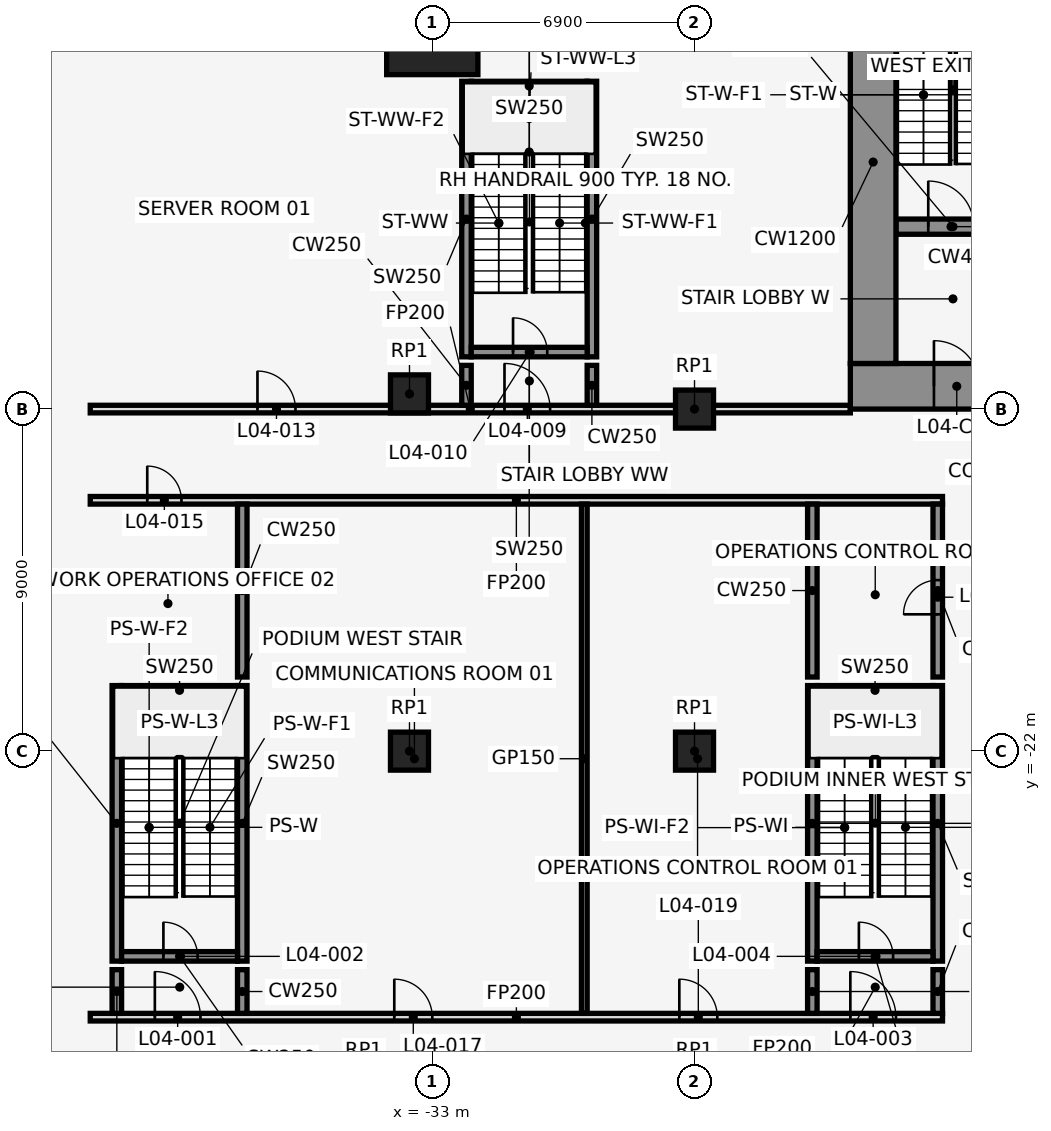
"""IFC4 building model, lengths in metres.
Left out: names, types, materials, properties, quantities, classifications, styles, units other than length and angle.
Written with IfcOpenShell. Run it as: python <this file> out.ifc"""

import sys

from ifc_helpers import new_model, si_unit, direction, frame, frame_2d, origin, origin_2d, place, context, subcontext, project, spatial, rectangle, extrude, element, fill, save


model = new_model("IFC4")
c1 = context("Model", 3, precision=1e-05, world=origin(), true_north=direction((0.0, 1.0)))
c2 = subcontext(c1, "Body", "Model", "MODEL_VIEW")
j1 = project(units=[si_unit("LENGTHUNIT", "METRE"), si_unit("PLANEANGLEUNIT", "RADIAN")], contexts=[c1])
p1 = place(None, origin())
s1 = spatial("IfcSite", under=j1, at=p1, CompositionType="ELEMENT")
p2 = place(p1, origin())
s2 = spatial("IfcBuilding", under=s1, at=p2, CompositionType="ELEMENT")
p3 = place(p2, frame((0.0, 0.0, 25.0)))
s3 = spatial("IfcBuildingStorey", under=s2, at=p3, CompositionType="ELEMENT", Elevation=25.0)
p4 = place(p3, frame((-33.0, -3.0, 0.0), z_axis=(0.0, 0.0, 1.0), x_axis=(1.0, 0.0, 0.0)))
e1 = element("IfcColumn", 1, at=p4, inside=s3, PredefinedType="COLUMN", context=c2, shape_type="SweptSolid", body=[
    extrude(rectangle(XDim=2.4, YDim=2.4, at=origin_2d()), origin(), (0.0, 0.0, 1.0), 5.0),
])
for number, where, z_axis, x_axis in (
    (2, (-33.6, -12.6, 0.0), (0.0, 0.0, 1.0), (1.0, 0.0, 0.0)),
    (3, (-33.6, -22.0, 0.0), (0.0, 0.0, 1.0), (1.0, 0.0, 0.0)),
    (4, (-26.1, -22.0, 0.0), (0.0, 0.0, 1.0), (1.0, 0.0, 0.0)),
    (5, (-26.1, -13.0, 0.0), (0.0, 0.0, 1.0), (1.0, 0.0, 0.0)),
):
    element("IfcColumn", number, at=place(p3, frame(where, z_axis=z_axis, x_axis=x_axis)), inside=s3, PredefinedType="COLUMN", context=c2, shape_type="SweptSolid", body=[
        extrude(rectangle(XDim=1.0, YDim=1.0, at=origin_2d()), origin(), (0.0, 0.0, 1.0), 5.0),
    ])
for number, where, z_axis, x_axis in (
    (6, (-32.1, -11.625, 0.0), (0.0, 0.0, 1.0), (0.0, 1.0, 0.0)),
    (7, (-28.8, -11.625, 0.0), (0.0, 0.0, 1.0), (0.0, 1.0, 0.0)),
):
    element("IfcWall", number, at=place(p3, frame(where, z_axis=z_axis, x_axis=x_axis)), inside=s3, PredefinedType="SHEAR", context=c2, shape_type="SweptSolid", body=[
        extrude(rectangle(XDim=7.25, YDim=0.25, at=frame_2d((3.625, 0.0))), origin(), (0.0, 0.0, 1.0), 5.0),
    ])
p5 = place(p3, frame((-31.975, -11.5, 0.0), z_axis=(0.0, 0.0, 1.0), x_axis=(1.0, 0.0, 0.0)))
e8 = element("IfcWall", 8, at=p5, inside=s3, PredefinedType="SHEAR", context=c2, shape_type="SweptSolid", body=[
    extrude(rectangle(XDim=3.05, YDim=0.25, at=frame_2d((1.525, 0.0))), origin(), (0.0, 0.0, 1.0), 5.0),
])
p6 = place(p5, frame((1.1, 0.0, 0.0)))
e9 = element("IfcOpeningElement", 9, at=p6, cuts=e8, PredefinedType="OPENING", context=c2, shape_type="SweptSolid", body=[
    extrude(rectangle(XDim=0.9, YDim=2.1, at=frame_2d((0.45, 1.05))), frame((0.0, 0.137, 0.0), z_axis=(0.0, -1.0, 0.0), x_axis=(1.0, 0.0, 0.0)), (0.0, 0.0, 1.0), 0.274),
])
p7 = place(p3, frame((-31.975, -4.5, 0.0), z_axis=(0.0, 0.0, 1.0), x_axis=(1.0, 0.0, 0.0)))
e10 = element("IfcWall", 10, at=p7, inside=s3, PredefinedType="SHEAR", context=c2, shape_type="SweptSolid", body=[
    extrude(rectangle(XDim=3.05, YDim=0.25, at=frame_2d((1.525, 0.0))), origin(), (0.0, 0.0, 1.0), 5.0),
])
for number, where, z_axis, x_axis in (
    (11, (-41.3, -27.525, 0.0), (0.0, 0.0, 1.0), (0.0, 1.0, 0.0)),
    (12, (-38.0, -27.525, 0.0), (0.0, 0.0, 1.0), (0.0, 1.0, 0.0)),
):
    element("IfcWall", number, at=place(p3, frame(where, z_axis=z_axis, x_axis=x_axis)), inside=s3, PredefinedType="SHEAR", context=c2, shape_type="SweptSolid", body=[
        extrude(rectangle(XDim=7.25, YDim=0.25, at=frame_2d((3.625, 0.0))), origin(), (0.0, 0.0, 1.0), 5.0),
    ])
p8 = place(p3, frame((-41.175, -27.4, 0.0), z_axis=(0.0, 0.0, 1.0), x_axis=(1.0, 0.0, 0.0)))
e13 = element("IfcWall", 13, at=p8, inside=s3, PredefinedType="SHEAR", context=c2, shape_type="SweptSolid", body=[
    extrude(rectangle(XDim=3.05, YDim=0.25, at=frame_2d((1.525, 0.0))), origin(), (0.0, 0.0, 1.0), 5.0),
])
p9 = place(p8, frame((1.1, 0.0, 0.0)))
e14 = element("IfcOpeningElement", 14, at=p9, cuts=e13, PredefinedType="OPENING", context=c2, shape_type="SweptSolid", body=[
    extrude(rectangle(XDim=0.9, YDim=2.1, at=frame_2d((0.45, 1.05))), frame((0.0, 0.137, 0.0), z_axis=(0.0, -1.0, 0.0), x_axis=(1.0, 0.0, 0.0)), (0.0, 0.0, 1.0), 0.274),
])
p10 = place(p3, frame((-41.175, -20.4, 0.0), z_axis=(0.0, 0.0, 1.0), x_axis=(1.0, 0.0, 0.0)))
e15 = element("IfcWall", 15, at=p10, inside=s3, PredefinedType="SHEAR", context=c2, shape_type="SweptSolid", body=[
    extrude(rectangle(XDim=3.05, YDim=0.25, at=frame_2d((1.525, 0.0))), origin(), (0.0, 0.0, 1.0), 5.0),
])
for number, where, z_axis, x_axis in (
    (16, (-23.0, -27.525, 0.0), (0.0, 0.0, 1.0), (0.0, 1.0, 0.0)),
    (17, (-19.7, -27.525, 0.0), (0.0, 0.0, 1.0), (0.0, 1.0, 0.0)),
):
    element("IfcWall", number, at=place(p3, frame(where, z_axis=z_axis, x_axis=x_axis)), inside=s3, PredefinedType="SHEAR", context=c2, shape_type="SweptSolid", body=[
        extrude(rectangle(XDim=7.25, YDim=0.25, at=frame_2d((3.625, 0.0))), origin(), (0.0, 0.0, 1.0), 5.0),
    ])
p11 = place(p3, frame((-22.875, -27.4, 0.0), z_axis=(0.0, 0.0, 1.0), x_axis=(1.0, 0.0, 0.0)))
e18 = element("IfcWall", 18, at=p11, inside=s3, PredefinedType="SHEAR", context=c2, shape_type="SweptSolid", body=[
    extrude(rectangle(XDim=3.05, YDim=0.25, at=frame_2d((1.525, 0.0))), origin(), (0.0, 0.0, 1.0), 5.0),
])
p12 = place(p11, frame((1.1, 0.0, 0.0)))
e19 = element("IfcOpeningElement", 19, at=p12, cuts=e18, PredefinedType="OPENING", context=c2, shape_type="SweptSolid", body=[
    extrude(rectangle(XDim=0.9, YDim=2.1, at=frame_2d((0.45, 1.05))), frame((0.0, 0.137, 0.0), z_axis=(0.0, -1.0, 0.0), x_axis=(1.0, 0.0, 0.0)), (0.0, 0.0, 1.0), 0.274),
])
p13 = place(p3, frame((-22.875, -20.4, 0.0), z_axis=(0.0, 0.0, 1.0), x_axis=(1.0, 0.0, 0.0)))
e20 = element("IfcWall", 20, at=p13, inside=s3, PredefinedType="SHEAR", context=c2, shape_type="SweptSolid", body=[
    extrude(rectangle(XDim=3.05, YDim=0.25, at=frame_2d((1.525, 0.0))), origin(), (0.0, 0.0, 1.0), 5.0),
])
p14 = place(p3, frame((-42.0, -29.0, 0.0), z_axis=(0.0, 0.0, 1.0), x_axis=(1.0, 0.0, 0.0)))
e21 = element("IfcWall", 21, at=p14, inside=s3, PredefinedType="PARTITIONING", context=c2, shape_type="SweptSolid", body=[
    extrude(rectangle(XDim=22.425, YDim=0.2, at=frame_2d((11.212, 0.0))), origin(), (0.0, 0.0, 1.0), 4.7),
])
p15 = place(p14, frame((1.7, 0.0, 0.0)))
e22 = element("IfcOpeningElement", 22, at=p15, cuts=e21, PredefinedType="OPENING", context=c2, shape_type="SweptSolid", body=[
    extrude(rectangle(XDim=1.2, YDim=2.1, at=frame_2d((0.6, 1.05))), frame((0.0, 0.112, 0.0), z_axis=(0.0, -1.0, 0.0), x_axis=(1.0, 0.0, 0.0)), (0.0, 0.0, 1.0), 0.224),
])
p16 = place(p14, frame((20.0, 0.0, 0.0)))
e23 = element("IfcOpeningElement", 23, at=p16, cuts=e21, PredefinedType="OPENING", context=c2, shape_type="SweptSolid", body=[
    extrude(rectangle(XDim=1.2, YDim=2.1, at=frame_2d((0.6, 1.05))), frame((0.0, 0.112, 0.0), z_axis=(0.0, -1.0, 0.0), x_axis=(1.0, 0.0, 0.0)), (0.0, 0.0, 1.0), 0.224),
])
p17 = place(p14, frame((8.0, 0.0, 0.0)))
e24 = element("IfcOpeningElement", 24, at=p17, cuts=e21, PredefinedType="OPENING", context=c2, shape_type="SweptSolid", body=[
    extrude(rectangle(XDim=1.0, YDim=2.1, at=frame_2d((0.5, 1.05))), frame((0.0, 0.112, 0.0), z_axis=(0.0, -1.0, 0.0), x_axis=(1.0, 0.0, 0.0)), (0.0, 0.0, 1.0), 0.224),
])
p18 = place(p14, frame((15.5, 0.0, 0.0)))
e25 = element("IfcOpeningElement", 25, at=p18, cuts=e21, PredefinedType="OPENING", context=c2, shape_type="SweptSolid", body=[
    extrude(rectangle(XDim=1.0, YDim=2.1, at=frame_2d((0.5, 1.05))), frame((0.0, 0.112, 0.0), z_axis=(0.0, -1.0, 0.0), x_axis=(1.0, 0.0, 0.0)), (0.0, 0.0, 1.0), 0.224),
])
p19 = place(p3, frame((-42.0, -15.4, 0.0), z_axis=(0.0, 0.0, 1.0), x_axis=(1.0, 0.0, 0.0)))
e26 = element("IfcWall", 26, at=p19, inside=s3, PredefinedType="PARTITIONING", context=c2, shape_type="SweptSolid", body=[
    extrude(rectangle(XDim=22.425, YDim=0.2, at=frame_2d((11.212, 0.0))), origin(), (0.0, 0.0, 1.0), 4.7),
])
p20 = place(p19, frame((1.5, 0.0, 0.0)))
e27 = element("IfcOpeningElement", 27, at=p20, cuts=e26, PredefinedType="OPENING", context=c2, shape_type="SweptSolid", body=[
    extrude(rectangle(XDim=0.9, YDim=2.1, at=frame_2d((0.45, 1.05))), frame((0.0, 0.112, 0.0), z_axis=(0.0, -1.0, 0.0), x_axis=(1.0, 0.0, 0.0)), (0.0, 0.0, 1.0), 0.224),
])
p21 = place(p3, frame((-42.0, -13.0, 0.0), z_axis=(0.0, 0.0, 1.0), x_axis=(1.0, 0.0, 0.0)))
e28 = element("IfcWall", 28, at=p21, inside=s3, PredefinedType="PARTITIONING", context=c2, shape_type="SweptSolid", body=[
    extrude(rectangle(XDim=20.0, YDim=0.2, at=frame_2d((10.0, 0.0))), origin(), (0.0, 0.0, 1.0), 4.7),
])
p22 = place(p21, frame((10.9, 0.0, 0.0)))
e29 = element("IfcOpeningElement", 29, at=p22, cuts=e28, PredefinedType="OPENING", context=c2, shape_type="SweptSolid", body=[
    extrude(rectangle(XDim=1.2, YDim=2.1, at=frame_2d((0.6, 1.05))), frame((0.0, 0.112, 0.0), z_axis=(0.0, -1.0, 0.0), x_axis=(1.0, 0.0, 0.0)), (0.0, 0.0, 1.0), 0.224),
])
p23 = place(p21, frame((4.4, 0.0, 0.0)))
e30 = element("IfcOpeningElement", 30, at=p23, cuts=e28, PredefinedType="OPENING", context=c2, shape_type="SweptSolid", body=[
    extrude(rectangle(XDim=1.0, YDim=2.1, at=frame_2d((0.5, 1.05))), frame((0.0, 0.112, 0.0), z_axis=(0.0, -1.0, 0.0), x_axis=(1.0, 0.0, 0.0)), (0.0, 0.0, 1.0), 0.224),
])
for number, where, z_axis, x_axis in (
    (31, (-41.3, -28.9, 0.0), (0.0, 0.0, 1.0), (0.0, 1.0, 0.0)),
    (32, (-38.0, -28.9, 0.0), (0.0, 0.0, 1.0), (0.0, 1.0, 0.0)),
):
    element("IfcWall", number, at=place(p3, frame(where, z_axis=z_axis, x_axis=x_axis)), inside=s3, PredefinedType="SHEAR", context=c2, shape_type="SweptSolid", body=[
        extrude(rectangle(XDim=1.15, YDim=0.25, at=frame_2d((0.575, 0.0))), origin(), (0.0, 0.0, 1.0), 5.0),
    ])
p24 = place(p3, frame((-38.0, -20.05, 0.0), z_axis=(0.0, 0.0, 1.0), x_axis=(0.0, 1.0, 0.0)))
e33 = element("IfcWall", 33, at=p24, inside=s3, PredefinedType="SHEAR", context=c2, shape_type="SweptSolid", body=[
    extrude(rectangle(XDim=4.55, YDim=0.25, at=frame_2d((2.275, 0.0))), origin(), (0.0, 0.0, 1.0), 5.0),
])
p25 = place(p3, frame((-32.1, -12.9, 0.0), z_axis=(0.0, 0.0, 1.0), x_axis=(0.0, 1.0, 0.0)))
e34 = element("IfcWall", 34, at=p25, inside=s3, PredefinedType="SHEAR", context=c2, shape_type="SweptSolid", body=[
    extrude(rectangle(XDim=1.05, YDim=0.25, at=frame_2d((0.525, 0.0))), origin(), (0.0, 0.0, 1.0), 5.0),
])
p26 = place(p3, frame((-29.0, -28.9, 0.0), z_axis=(0.0, 0.0, 1.0), x_axis=(0.0, 1.0, 0.0)))
e35 = element("IfcWall", 35, at=p26, inside=s3, PredefinedType="PARTITIONING", context=c2, shape_type="SweptSolid", body=[
    extrude(rectangle(XDim=13.4, YDim=0.15, at=frame_2d((6.7, 0.0))), origin(), (0.0, 0.0, 1.0), 4.7),
])
p27 = place(p3, frame((-28.8, -12.9, 0.0), z_axis=(0.0, 0.0, 1.0), x_axis=(0.0, 1.0, 0.0)))
e36 = element("IfcWall", 36, at=p27, inside=s3, PredefinedType="SHEAR", context=c2, shape_type="SweptSolid", body=[
    extrude(rectangle(XDim=1.05, YDim=0.25, at=frame_2d((0.525, 0.0))), origin(), (0.0, 0.0, 1.0), 5.0),
])
p28 = place(p3, frame((-23.0, -28.9, 0.0), z_axis=(0.0, 0.0, 1.0), x_axis=(0.0, 1.0, 0.0)))
e37 = element("IfcWall", 37, at=p28, inside=s3, PredefinedType="SHEAR", context=c2, shape_type="SweptSolid", body=[
    extrude(rectangle(XDim=1.15, YDim=0.25, at=frame_2d((0.575, 0.0))), origin(), (0.0, 0.0, 1.0), 5.0),
])
p29 = place(p3, frame((-23.0, -20.05, 0.0), z_axis=(0.0, 0.0, 1.0), x_axis=(0.0, 1.0, 0.0)))
e38 = element("IfcWall", 38, at=p29, inside=s3, PredefinedType="SHEAR", context=c2, shape_type="SweptSolid", body=[
    extrude(rectangle(XDim=4.55, YDim=0.25, at=frame_2d((2.275, 0.0))), origin(), (0.0, 0.0, 1.0), 5.0),
])
p30 = place(p3, frame((-19.7, -28.9, 0.0), z_axis=(0.0, 0.0, 1.0), x_axis=(0.0, 1.0, 0.0)))
e39 = element("IfcWall", 39, at=p30, inside=s3, PredefinedType="SHEAR", context=c2, shape_type="SweptSolid", body=[
    extrude(rectangle(XDim=1.15, YDim=0.25, at=frame_2d((0.575, 0.0))), origin(), (0.0, 0.0, 1.0), 5.0),
])
p31 = place(p3, frame((-19.7, -20.05, 0.0), z_axis=(0.0, 0.0, 1.0), x_axis=(0.0, 1.0, 0.0)))
e40 = element("IfcWall", 40, at=p31, inside=s3, PredefinedType="SHEAR", context=c2, shape_type="SweptSolid", body=[
    extrude(rectangle(XDim=4.55, YDim=0.25, at=frame_2d((2.275, 0.0))), origin(), (0.0, 0.0, 1.0), 5.0),
])
p32 = place(p31, frame((1.65, 0.0, 0.0)))
e41 = element("IfcOpeningElement", 41, at=p32, cuts=e40, PredefinedType="OPENING", context=c2, shape_type="SweptSolid", body=[
    extrude(rectangle(XDim=0.9, YDim=2.1, at=frame_2d((0.45, 1.05))), frame((0.0, 0.137, 0.0), z_axis=(0.0, -1.0, 0.0), x_axis=(1.0, 0.0, 0.0)), (0.0, 0.0, 1.0), 0.274),
])
p33 = place(p3, frame((-20.8, -8.2, 0.0), z_axis=(0.0, 0.0, 1.0), x_axis=(1.0, 0.0, 0.0)))
e42 = element("IfcWall", 42, at=p33, inside=s3, PredefinedType="SHEAR", context=c2, shape_type="SweptSolid", body=[
    extrude(rectangle(XDim=3.0, YDim=0.4, at=frame_2d((1.5, 0.0))), origin(), (0.0, 0.0, 1.0), 5.0),
])
p34 = place(p33, frame((0.85, 0.0, 0.0)))
e43 = element("IfcOpeningElement", 43, at=p34, cuts=e42, PredefinedType="OPENING", context=c2, shape_type="SweptSolid", body=[
    extrude(rectangle(XDim=1.2, YDim=2.1, at=frame_2d((0.6, 1.05))), frame((0.0, 0.212, 0.0), z_axis=(0.0, -1.0, 0.0), x_axis=(1.0, 0.0, 0.0)), (0.0, 0.0, 1.0), 0.424),
])
p35 = place(p3, frame((-22.0, -12.4, 0.0), z_axis=(0.0, 0.0, 1.0), x_axis=(1.0, 0.0, 0.0)))
e44 = element("IfcWall", 44, at=p35, inside=s3, PredefinedType="SHEAR", context=c2, shape_type="SweptSolid", body=[
    extrude(rectangle(XDim=44.0, YDim=1.2, at=frame_2d((22.0, 0.0))), origin(), (0.0, 0.0, 1.0), 5.0),
])
p36 = place(p35, frame((2.2, 0.0, 0.0)))
e45 = element("IfcOpeningElement", 45, at=p36, cuts=e44, PredefinedType="OPENING", context=c2, shape_type="SweptSolid", body=[
    extrude(rectangle(XDim=1.2, YDim=2.1, at=frame_2d((0.6, 1.05))), frame((0.0, 0.612, 0.0), z_axis=(0.0, -1.0, 0.0), x_axis=(1.0, 0.0, 0.0)), (0.0, 0.0, 1.0), 1.224),
])
p37 = place(p35, frame((21.4, 0.0, 0.0)))
e46 = element("IfcOpeningElement", 46, at=p37, cuts=e44, PredefinedType="OPENING", context=c2, shape_type="SweptSolid", body=[
    extrude(rectangle(XDim=1.2, YDim=2.1, at=frame_2d((0.6, 1.05))), frame((0.0, 0.612, 0.0), z_axis=(0.0, -1.0, 0.0), x_axis=(1.0, 0.0, 0.0)), (0.0, 0.0, 1.0), 1.224),
])
p38 = place(p35, frame((40.6, 0.0, 0.0)))
e47 = element("IfcOpeningElement", 47, at=p38, cuts=e44, PredefinedType="OPENING", context=c2, shape_type="SweptSolid", body=[
    extrude(rectangle(XDim=1.2, YDim=2.1, at=frame_2d((0.6, 1.05))), frame((0.0, 0.612, 0.0), z_axis=(0.0, -1.0, 0.0), x_axis=(1.0, 0.0, 0.0)), (0.0, 0.0, 1.0), 1.224),
])
p39 = place(p35, frame((16.0, 0.0, 0.0)))
e48 = element("IfcOpeningElement", 48, at=p39, cuts=e44, PredefinedType="OPENING", context=c2, shape_type="SweptSolid", body=[
    extrude(rectangle(XDim=1.8, YDim=2.1, at=frame_2d((0.9, 1.05))), frame((0.0, 0.612, 0.0), z_axis=(0.0, -1.0, 0.0), x_axis=(1.0, 0.0, 0.0)), (0.0, 0.0, 1.0), 1.224),
])
p40 = place(p35, frame((6.3, 0.0, 0.0)))
e49 = element("IfcOpeningElement", 49, at=p40, cuts=e44, PredefinedType="OPENING", context=c2, shape_type="SweptSolid", body=[
    extrude(rectangle(XDim=1.2, YDim=2.1, at=frame_2d((0.6, 1.05))), frame((0.0, 0.612, 0.0), z_axis=(0.0, -1.0, 0.0), x_axis=(1.0, 0.0, 0.0)), (0.0, 0.0, 1.0), 1.224),
])
p41 = place(p35, frame((26.2, 0.0, 0.0)))
e50 = element("IfcOpeningElement", 50, at=p41, cuts=e44, PredefinedType="OPENING", context=c2, shape_type="SweptSolid", body=[
    extrude(rectangle(XDim=1.8, YDim=2.1, at=frame_2d((0.9, 1.05))), frame((0.0, 0.612, 0.0), z_axis=(0.0, -1.0, 0.0), x_axis=(1.0, 0.0, 0.0)), (0.0, 0.0, 1.0), 1.224),
])
p42 = place(p35, frame((36.5, 0.0, 0.0)))
e51 = element("IfcOpeningElement", 51, at=p42, cuts=e44, PredefinedType="OPENING", context=c2, shape_type="SweptSolid", body=[
    extrude(rectangle(XDim=1.2, YDim=2.1, at=frame_2d((0.6, 1.05))), frame((0.0, 0.612, 0.0), z_axis=(0.0, -1.0, 0.0), x_axis=(1.0, 0.0, 0.0)), (0.0, 0.0, 1.0), 1.224),
])
p43 = place(p3, frame((-21.4, -11.8, 0.0), z_axis=(0.0, 0.0, 1.0), x_axis=(0.0, 1.0, 0.0)))
e52 = element("IfcWall", 52, at=p43, inside=s3, PredefinedType="SHEAR", context=c2, shape_type="SweptSolid", body=[
    extrude(rectangle(XDim=10.6, YDim=1.2, at=frame_2d((5.3, 0.0))), origin(), (0.0, 0.0, 1.0), 5.0),
])
p44 = place(p15, origin())
e53 = element("IfcDoor", 53, at=p44, inside=s3, OperationType="SINGLE_SWING_LEFT", PredefinedType="DOOR", context=c2, shape_type="SweptSolid", body=[
    extrude(rectangle(XDim=1.2, YDim=2.1, at=frame_2d((0.6, 1.05))), frame((0.0, 0.025, 0.0), z_axis=(0.0, -1.0, 0.0), x_axis=(1.0, 0.0, 0.0)), (0.0, 0.0, 1.0), 0.05),
])
fill(e22, e53)
p45 = place(p9, origin())
e54 = element("IfcDoor", 54, at=p45, inside=s3, OperationType="SINGLE_SWING_LEFT", PredefinedType="DOOR", context=c2, shape_type="SweptSolid", body=[
    extrude(rectangle(XDim=0.9, YDim=2.1, at=frame_2d((0.45, 1.05))), frame((0.0, 0.025, 0.0), z_axis=(0.0, -1.0, 0.0), x_axis=(1.0, 0.0, 0.0)), (0.0, 0.0, 1.0), 0.05),
])
fill(e14, e54)
p46 = place(p16, origin())
e55 = element("IfcDoor", 55, at=p46, inside=s3, OperationType="SINGLE_SWING_RIGHT", PredefinedType="DOOR", context=c2, shape_type="SweptSolid", body=[
    extrude(rectangle(XDim=1.2, YDim=2.1, at=frame_2d((0.6, 1.05))), frame((0.0, 0.025, 0.0), z_axis=(0.0, -1.0, 0.0), x_axis=(1.0, 0.0, 0.0)), (0.0, 0.0, 1.0), 0.05),
])
fill(e23, e55)
p47 = place(p12, origin())
e56 = element("IfcDoor", 56, at=p47, inside=s3, OperationType="SINGLE_SWING_LEFT", PredefinedType="DOOR", context=c2, shape_type="SweptSolid", body=[
    extrude(rectangle(XDim=0.9, YDim=2.1, at=frame_2d((0.45, 1.05))), frame((0.0, 0.025, 0.0), z_axis=(0.0, -1.0, 0.0), x_axis=(1.0, 0.0, 0.0)), (0.0, 0.0, 1.0), 0.05),
])
fill(e19, e56)
p48 = place(p22, origin())
e57 = element("IfcDoor", 57, at=p48, inside=s3, OperationType="SINGLE_SWING_RIGHT", PredefinedType="DOOR", context=c2, shape_type="SweptSolid", body=[
    extrude(rectangle(XDim=1.2, YDim=2.1, at=frame_2d((0.6, 1.05))), frame((0.0, 0.025, 0.0), z_axis=(0.0, -1.0, 0.0), x_axis=(1.0, 0.0, 0.0)), (0.0, 0.0, 1.0), 0.05),
])
fill(e29, e57)
p49 = place(p6, origin())
e58 = element("IfcDoor", 58, at=p49, inside=s3, OperationType="SINGLE_SWING_LEFT", PredefinedType="DOOR", context=c2, shape_type="SweptSolid", body=[
    extrude(rectangle(XDim=0.9, YDim=2.1, at=frame_2d((0.45, 1.05))), frame((0.0, 0.025, 0.0), z_axis=(0.0, -1.0, 0.0), x_axis=(1.0, 0.0, 0.0)), (0.0, 0.0, 1.0), 0.05),
])
fill(e9, e58)
p50 = place(p23, origin())
e59 = element("IfcDoor", 59, at=p50, inside=s3, OperationType="SINGLE_SWING_LEFT", PredefinedType="DOOR", context=c2, shape_type="SweptSolid", body=[
    extrude(rectangle(XDim=1.0, YDim=2.1, at=frame_2d((0.5, 1.05))), frame((0.0, 0.025, 0.0), z_axis=(0.0, -1.0, 0.0), x_axis=(1.0, 0.0, 0.0)), (0.0, 0.0, 1.0), 0.05),
])
fill(e30, e59)
p51 = place(p20, frame((0.9, 0.0, 0.0), z_axis=(0.0, 0.0, 1.0), x_axis=(-1.0, 0.0, 0.0)))
e60 = element("IfcDoor", 60, at=p51, inside=s3, OperationType="SINGLE_SWING_RIGHT", PredefinedType="DOOR", context=c2, shape_type="SweptSolid", body=[
    extrude(rectangle(XDim=0.9, YDim=2.1, at=frame_2d((0.45, 1.05))), frame((0.0, 0.025, 0.0), z_axis=(0.0, -1.0, 0.0), x_axis=(1.0, 0.0, 0.0)), (0.0, 0.0, 1.0), 0.05),
])
fill(e27, e60)
p52 = place(p17, origin())
e61 = element("IfcDoor", 61, at=p52, inside=s3, OperationType="SINGLE_SWING_LEFT", PredefinedType="DOOR", context=c2, shape_type="SweptSolid", body=[
    extrude(rectangle(XDim=1.0, YDim=2.1, at=frame_2d((0.5, 1.05))), frame((0.0, 0.025, 0.0), z_axis=(0.0, -1.0, 0.0), x_axis=(1.0, 0.0, 0.0)), (0.0, 0.0, 1.0), 0.05),
])
fill(e24, e61)
p53 = place(p18, origin())
e62 = element("IfcDoor", 62, at=p53, inside=s3, OperationType="SINGLE_SWING_LEFT", PredefinedType="DOOR", context=c2, shape_type="SweptSolid", body=[
    extrude(rectangle(XDim=1.0, YDim=2.1, at=frame_2d((0.5, 1.05))), frame((0.0, 0.025, 0.0), z_axis=(0.0, -1.0, 0.0), x_axis=(1.0, 0.0, 0.0)), (0.0, 0.0, 1.0), 0.05),
])
fill(e25, e62)
p54 = place(p32, origin())
e63 = element("IfcDoor", 63, at=p54, inside=s3, OperationType="SINGLE_SWING_RIGHT", PredefinedType="DOOR", context=c2, shape_type="SweptSolid", body=[
    extrude(rectangle(XDim=0.9, YDim=2.1, at=frame_2d((0.45, 1.05))), frame((0.0, 0.025, 0.0), z_axis=(0.0, -1.0, 0.0), x_axis=(1.0, 0.0, 0.0)), (0.0, 0.0, 1.0), 0.05),
])
fill(e41, e63)
p55 = place(p34, origin())
e64 = element("IfcDoor", 64, at=p55, inside=s3, OperationType="SINGLE_SWING_LEFT", PredefinedType="DOOR", context=c2, shape_type="SweptSolid", body=[
    extrude(rectangle(XDim=1.2, YDim=2.1, at=frame_2d((0.6, 1.05))), frame((0.0, 0.025, 0.0), z_axis=(0.0, -1.0, 0.0), x_axis=(1.0, 0.0, 0.0)), (0.0, 0.0, 1.0), 0.05),
])
fill(e43, e64)
p56 = place(p36, frame((1.2, 0.0, 0.0), z_axis=(0.0, 0.0, 1.0), x_axis=(-1.0, 0.0, 0.0)))
e65 = element("IfcDoor", 65, at=p56, inside=s3, OperationType="SINGLE_SWING_RIGHT", PredefinedType="DOOR", context=c2, shape_type="SweptSolid", body=[
    extrude(rectangle(XDim=1.2, YDim=2.1, at=frame_2d((0.6, 1.05))), frame((0.0, 0.025, 0.0), z_axis=(0.0, -1.0, 0.0), x_axis=(1.0, 0.0, 0.0)), (0.0, 0.0, 1.0), 0.05),
])
fill(e45, e65)
save(model, sys.argv[1])
